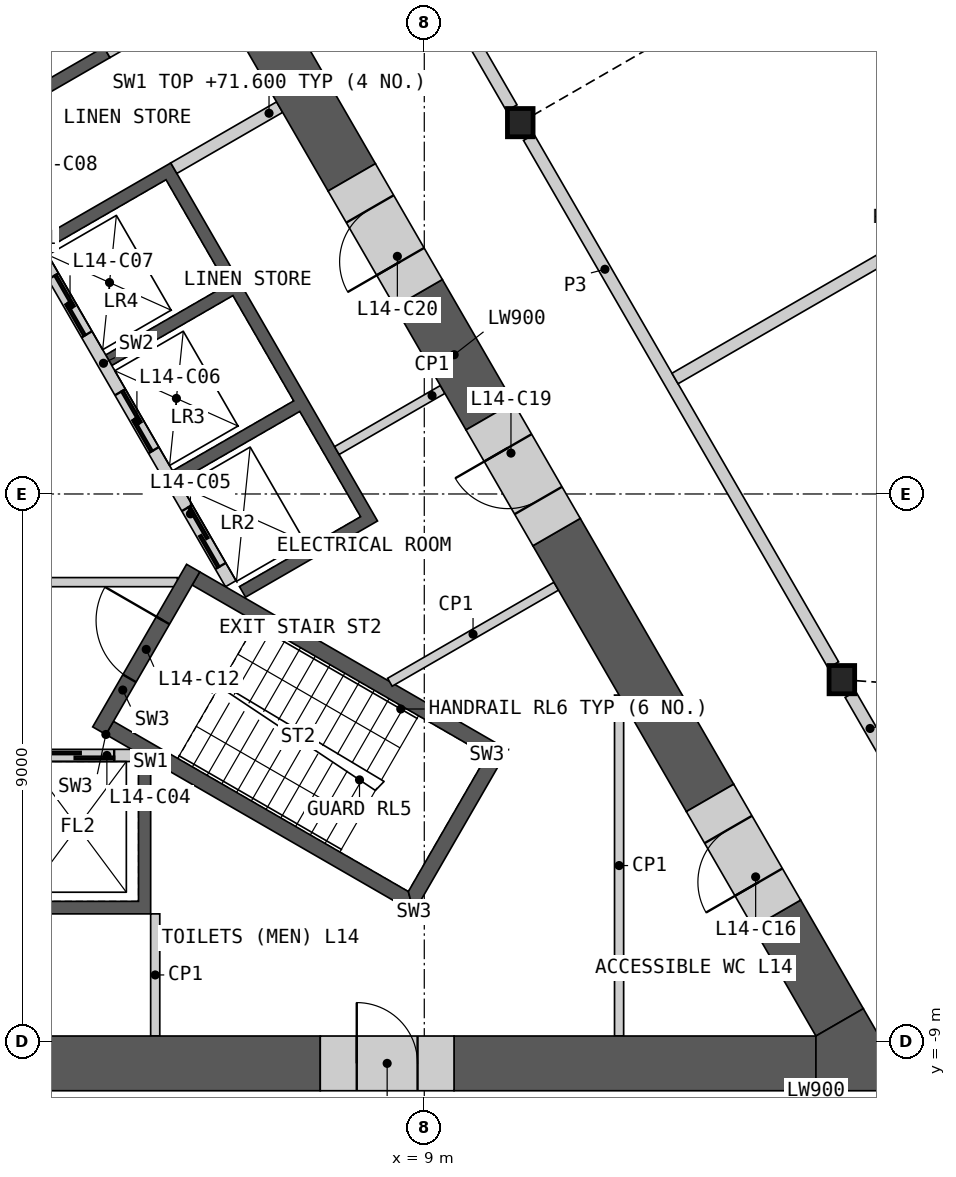
"""IFC4 building model, lengths in metres.
Left out: names, types, materials, properties, quantities, classifications, styles, units other than length and angle.
Written with IfcOpenShell. Run it as: python <this file> out.ifc"""

import sys

from ifc_helpers import new_model, si_unit, direction, frame, frame_2d, origin, origin_2d, place, context, subcontext, project, spatial, polyline, rectangle, i_section, outline, extrude, element, fill, save


model = new_model("IFC4")
c1 = context("Model", 3, precision=1e-05, world=origin(), true_north=direction((0.0, 1.0)))
c2 = subcontext(c1, "Body", "Model", "MODEL_VIEW")
j1 = project(units=[si_unit("LENGTHUNIT", "METRE"), si_unit("PLANEANGLEUNIT", "RADIAN")], contexts=[c1])
p1 = place(None, origin())
s1 = spatial("IfcSite", under=j1, at=p1, CompositionType="ELEMENT")
p2 = place(p1, origin())
s2 = spatial("IfcBuilding", under=s1, at=p2, CompositionType="ELEMENT")
p3 = place(p2, frame((0.0, 0.0, 67.8)))
s3 = spatial("IfcBuildingStorey", under=s2, at=p3, CompositionType="ELEMENT", Elevation=67.8)
for number, where, z_axis, x_axis in (
    (1, (15.868, -3.054, 0.0), (0.0, 0.0, 1.0), (1.0, 0.0, 0.0)),
    (2, (10.578, 6.107, 0.0), (0.0, 0.0, 1.0), (1.0, 0.0, 0.0)),
):
    element("IfcColumn", number, at=place(p3, frame(where, z_axis=z_axis, x_axis=x_axis)), inside=s3, PredefinedType="COLUMN", context=c2, shape_type="SweptSolid", body=[
        extrude(i_section(OverallWidth=0.421, OverallDepth=0.465, WebThickness=0.045, FlangeThickness=0.072, at=origin_2d()), origin(), (0.0, 0.0, 1.0), 4.2),
    ])
p4 = place(p3, origin())
e3 = element("IfcWall", 3, at=p4, inside=s3, PredefinedType="SHEAR", context=c2, shape_type="SweptSolid", body=[
    extrude(outline(polyline([(4.5, -4.4), (4.5, -6.906), (-4.5, -6.906), (-4.5, -4.4), (-4.3, -4.4), (-4.3, -6.7), (-2.3, -6.7), (-2.3, -4.4), (-2.1, -4.4), (-2.1, -6.7), (-0.1, -6.7), (-0.1, -4.4), (0.1, -4.4), (0.1, -6.7), (2.1, -6.7), (2.1, -4.4), (2.3, -4.4), (2.3, -6.7), (4.3, -6.7), (4.3, -4.4), (4.5, -4.4)])), origin(), (0.0, 0.0, 1.0), 3.8),
])
p5 = place(p3, frame((-4.187, -4.3, 0.0), z_axis=(0.0, 0.0, 1.0), x_axis=(1.0, 0.0, 0.0)))
e4 = element("IfcWall", 4, at=p5, inside=s3, PredefinedType="SOLIDWALL", context=c2, shape_type="SweptSolid", body=[
    extrude(rectangle(XDim=8.373, YDim=0.2, at=frame_2d((4.187, 0.0))), origin(), (0.0, 0.0, 1.0), 3.8),
])
p6 = place(p5, frame((0.287, 0.0, 0.0)))
e5 = element("IfcOpeningElement", 5, at=p6, cuts=e4, PredefinedType="OPENING", context=c2, shape_type="SweptSolid", body=[
    extrude(rectangle(XDim=1.2, YDim=2.1, at=frame_2d((0.6, 1.05))), frame((0.0, 0.11, 0.0), z_axis=(0.0, -1.0, 0.0), x_axis=(1.0, 0.0, 0.0)), (0.0, 0.0, 1.0), 0.22),
])
p7 = place(p5, frame((2.387, 0.0, 0.0)))
e6 = element("IfcOpeningElement", 6, at=p7, cuts=e4, PredefinedType="OPENING", context=c2, shape_type="SweptSolid", body=[
    extrude(rectangle(XDim=1.4, YDim=2.1, at=frame_2d((0.7, 1.05))), frame((0.0, 0.11, 0.0), z_axis=(0.0, -1.0, 0.0), x_axis=(1.0, 0.0, 0.0)), (0.0, 0.0, 1.0), 0.22),
])
p8 = place(p5, frame((4.737, 0.0, 0.0)))
e7 = element("IfcOpeningElement", 7, at=p8, cuts=e4, PredefinedType="OPENING", context=c2, shape_type="SweptSolid", body=[
    extrude(rectangle(XDim=1.1, YDim=2.1, at=frame_2d((0.55, 1.05))), frame((0.0, 0.11, 0.0), z_axis=(0.0, -1.0, 0.0), x_axis=(1.0, 0.0, 0.0)), (0.0, 0.0, 1.0), 0.22),
])
p9 = place(p5, frame((6.887, 0.0, 0.0)))
e8 = element("IfcOpeningElement", 8, at=p9, cuts=e4, PredefinedType="OPENING", context=c2, shape_type="SweptSolid", body=[
    extrude(rectangle(XDim=1.2, YDim=2.1, at=frame_2d((0.6, 1.05))), frame((0.0, 0.11, 0.0), z_axis=(0.0, -1.0, 0.0), x_axis=(1.0, 0.0, 0.0)), (0.0, 0.0, 1.0), 0.22),
])
p10 = place(p3, origin())
e9 = element("IfcWall", 9, at=p10, inside=s3, PredefinedType="SHEAR", context=c2, shape_type="SweptSolid", body=[
    extrude(outline(polyline([(1.561, 6.097), (3.731, 7.35), (3.831, 7.177), (1.66, 5.924), (1.561, 6.097)])), origin(), (0.0, 0.0, 1.0), 3.8),
])
p11 = place(p3, origin())
e10 = element("IfcWall", 10, at=p11, inside=s3, PredefinedType="SHEAR", context=c2, shape_type="SweptSolid", body=[
    extrude(outline(polyline([(2.66, 4.192), (4.831, 5.445), (8.231, -0.444), (6.061, -1.697), (5.96, -1.524), (7.952, -0.374), (6.952, 1.358), (4.96, 0.208), (4.861, 0.381), (6.852, 1.531), (5.852, 3.263), (3.861, 2.113), (3.76, 2.287), (5.752, 3.437), (4.752, 5.169), (2.76, 4.019), (2.66, 4.192)])), origin(), (0.0, 0.0, 1.0), 3.8),
])
p12 = place(p3, frame((5.817, -1.476, 0.0), z_axis=(0.0, 0.0, 1.0), x_axis=(-0.500002616675, 0.866023893041, 0.0)))
e11 = element("IfcWall", 11, at=p12, inside=s3, PredefinedType="SOLIDWALL", context=c2, shape_type="SweptSolid", body=[
    extrude(rectangle(XDim=8.373, YDim=0.2, at=frame_2d((4.187, 0.0))), origin(), (0.0, 0.0, 1.0), 3.8),
])
p13 = place(p12, frame((0.337, 0.0, 0.0)))
e12 = element("IfcOpeningElement", 12, at=p13, cuts=e11, PredefinedType="OPENING", context=c2, shape_type="SweptSolid", body=[
    extrude(rectangle(XDim=1.1, YDim=2.1, at=frame_2d((0.55, 1.05))), frame((0.0, 0.11, 0.0), z_axis=(0.0, -1.0, 0.0), x_axis=(1.0, 0.0, 0.0)), (0.0, 0.0, 1.0), 0.22),
])
p14 = place(p12, frame((2.537, 0.0, 0.0)))
e13 = element("IfcOpeningElement", 13, at=p14, cuts=e11, PredefinedType="OPENING", context=c2, shape_type="SweptSolid", body=[
    extrude(rectangle(XDim=1.1, YDim=2.1, at=frame_2d((0.55, 1.05))), frame((0.0, 0.11, 0.0), z_axis=(0.0, -1.0, 0.0), x_axis=(1.0, 0.0, 0.0)), (0.0, 0.0, 1.0), 0.22),
])
p15 = place(p12, frame((4.737, 0.0, 0.0)))
e14 = element("IfcOpeningElement", 14, at=p15, cuts=e11, PredefinedType="OPENING", context=c2, shape_type="SweptSolid", body=[
    extrude(rectangle(XDim=1.1, YDim=2.1, at=frame_2d((0.55, 1.05))), frame((0.0, 0.11, 0.0), z_axis=(0.0, -1.0, 0.0), x_axis=(1.0, 0.0, 0.0)), (0.0, 0.0, 1.0), 0.22),
])
p16 = place(p12, frame((7.037, 0.0, 0.0)))
e15 = element("IfcOpeningElement", 15, at=p16, cuts=e11, PredefinedType="OPENING", context=c2, shape_type="SweptSolid", body=[
    extrude(rectangle(XDim=0.9, YDim=2.1, at=frame_2d((0.45, 1.05))), frame((0.0, 0.11, 0.0), z_axis=(0.0, -1.0, 0.0), x_axis=(1.0, 0.0, 0.0)), (0.0, 0.0, 1.0), 0.22),
])
p17 = place(p3, frame((4.881, 5.358, 0.0), z_axis=(0.0, 0.0, 1.0), x_axis=(0.866035824272, 0.499981950752, 0.0)))
e16 = element("IfcWall", 16, at=p17, inside=s3, PredefinedType="SHEAR", context=c2, shape_type="SweptSolid", body=[
    extrude(rectangle(XDim=2.009, YDim=0.2, at=frame_2d((1.004, 0.0))), origin(), (0.0, 0.0, 1.0), 3.8),
])
p18 = place(p3, frame((3.781, 7.263, 0.0), z_axis=(0.0, 0.0, 1.0), x_axis=(0.865983199114, 0.50007309351, 0.0)))
e17 = element("IfcWall", 17, at=p18, inside=s3, PredefinedType="SHEAR", context=c2, shape_type="SweptSolid", body=[
    extrude(rectangle(XDim=2.009, YDim=0.2, at=frame_2d((1.004, 0.0))), origin(), (0.0, 0.0, 1.0), 3.8),
])
p19 = place(p3, frame((-4.941, -1.45, 0.0), z_axis=(0.0, 0.0, 1.0), x_axis=(1.0, 0.0, 0.0)))
e18 = element("IfcWall", 18, at=p19, inside=s3, PredefinedType="PARTITIONING", context=c2, shape_type="SweptSolid", body=[
    extrude(rectangle(XDim=9.882, YDim=0.15, at=frame_2d((4.941, 0.0))), origin(), (0.0, 0.0, 1.0), 3.8),
])
p20 = place(p19, frame((4.391, 0.0, 0.0)))
e19 = element("IfcOpeningElement", 19, at=p20, cuts=e18, PredefinedType="OPENING", context=c2, shape_type="SweptSolid", body=[
    extrude(rectangle(XDim=1.1, YDim=2.1, at=frame_2d((0.55, 1.05))), frame((0.0, 0.085, 0.0), z_axis=(0.0, -1.0, 0.0), x_axis=(1.0, 0.0, 0.0)), (0.0, 0.0, 1.0), 0.17),
])
p21 = place(p3, origin())
e20 = element("IfcWall", 20, at=p21, inside=s3, PredefinedType="SHEAR", context=c2, shape_type="SweptSolid", body=[
    extrude(outline(polyline([(3.763, -3.956), (8.83, -6.881), (8.738, -6.539), (3.888, -3.739), (3.763, -3.956)])), origin(), (0.0, 0.0, 1.0), 3.8),
])
p22 = place(p3, origin())
e21 = element("IfcWall", 21, at=p22, inside=s3, PredefinedType="SHEAR", context=c2, shape_type="SweptSolid", body=[
    extrude(outline(polyline([(8.83, -6.881), (10.374, -4.206), (10.032, -4.298), (8.738, -6.539), (8.83, -6.881)])), origin(), (0.0, 0.0, 1.0), 3.8),
])
p23 = place(p3, origin())
e22 = element("IfcWall", 22, at=p23, inside=s3, PredefinedType="SHEAR", context=c2, shape_type="SweptSolid", body=[
    extrude(outline(polyline([(10.032, -4.298), (10.374, -4.206), (5.307, -1.281), (5.182, -1.498), (10.032, -4.298)])), origin(), (0.0, 0.0, 1.0), 3.8),
])
p24 = place(p3, frame((3.655, -3.893, 0.0), z_axis=(0.0, 0.0, 1.0), x_axis=(0.499982516597, 0.866035497597, 0.0)))
e23 = element("IfcWall", 23, at=p24, inside=s3, PredefinedType="SHEAR", context=c2, shape_type="SweptSolid", body=[
    extrude(rectangle(XDim=3.088, YDim=0.25, at=frame_2d((1.544, 0.0))), origin(), (0.0, 0.0, 1.0), 3.8),
])
p25 = place(p24, frame((0.994, 0.0, 0.0)))
e24 = element("IfcOpeningElement", 24, at=p25, cuts=e23, PredefinedType="OPENING", context=c2, shape_type="SweptSolid", body=[
    extrude(rectangle(XDim=1.1, YDim=2.1, at=frame_2d((0.55, 1.05))), frame((0.0, 0.135, 0.0), z_axis=(0.0, -1.0, 0.0), x_axis=(1.0, 0.0, 0.0)), (0.0, 0.0, 1.0), 0.27),
])
p26 = place(p3, frame((4.575, -6.906, 0.0), z_axis=(0.0, 0.0, 1.0), x_axis=(0.0, -1.0, 0.0)))
e25 = element("IfcWall", 25, at=p26, inside=s3, PredefinedType="PARTITIONING", context=c2, shape_type="SweptSolid", body=[
    extrude(rectangle(XDim=2.009, YDim=0.15, at=frame_2d((1.004, 0.0))), origin(), (0.0, 0.0, 1.0), 3.8),
])
p27 = place(p3, frame((9.302, 1.719, 0.0), z_axis=(0.0, 0.0, 1.0), x_axis=(-0.866035824272, -0.499981950752, 0.0)))
e26 = element("IfcWall", 26, at=p27, inside=s3, PredefinedType="PARTITIONING", context=c2, shape_type="SweptSolid", body=[
    extrude(rectangle(XDim=2.009, YDim=0.15, at=frame_2d((1.004, 0.0))), origin(), (0.0, 0.0, 1.0), 3.8),
])
p28 = place(p3, frame((11.17, -1.517, 0.0), z_axis=(0.0, 0.0, 1.0), x_axis=(-0.866037599206, -0.499978876315, 0.0)))
e27 = element("IfcWall", 27, at=p28, inside=s3, PredefinedType="PARTITIONING", context=c2, shape_type="SweptSolid", body=[
    extrude(rectangle(XDim=3.159, YDim=0.15, at=frame_2d((1.58, 0.0))), origin(), (0.0, 0.0, 1.0), 3.8),
])
p29 = place(p3, frame((12.204, -8.915, 0.0), z_axis=(0.0, 0.0, 1.0), x_axis=(0.0, 1.0, 0.0)))
e28 = element("IfcWall", 28, at=p29, inside=s3, PredefinedType="PARTITIONING", context=c2, shape_type="SweptSolid", body=[
    extrude(rectangle(XDim=5.607, YDim=0.15, at=frame_2d((2.804, 0.0))), origin(), (0.0, 0.0, 1.0), 3.8),
])
p30 = place(p3, frame((1.1, -9.365, 0.0), z_axis=(0.0, 0.0, 1.0), x_axis=(1.0, 0.0, 0.0)))
e29 = element("IfcWall", 29, at=p30, inside=s3, PredefinedType="SHEAR", context=c2, shape_type="SweptSolid", body=[
    extrude(rectangle(XDim=6.189, YDim=0.9, at=frame_2d((3.095, 0.0))), origin(), (0.0, 0.0, 1.0), 3.8),
])
p31 = place(p3, frame((9.49, -9.365, 0.0), z_axis=(0.0, 0.0, 1.0), x_axis=(1.0, 0.0, 0.0)))
e30 = element("IfcWall", 30, at=p31, inside=s3, PredefinedType="SHEAR", context=c2, shape_type="SweptSolid", body=[
    extrude(rectangle(XDim=5.952, YDim=0.9, at=frame_2d((2.976, 0.0))), origin(), (0.0, 0.0, 1.0), 3.8),
])
p32 = place(p3, frame((7.807, 5.208, 0.0), z_axis=(0.0, 0.0, 1.0), x_axis=(-0.499986664161, 0.866033103098, 0.0)))
e31 = element("IfcWall", 31, at=p32, inside=s3, PredefinedType="SHEAR", context=c2, shape_type="SweptSolid", body=[
    extrude(rectangle(XDim=6.586, YDim=0.9, at=frame_2d((3.293, 0.0))), origin(), (0.0, 0.0, 1.0), 3.8),
])
p33 = place(p3, frame((13.7, -4.999, 0.0), z_axis=(0.0, 0.0, 1.0), x_axis=(-0.499993158726, 0.86602935356, 0.0)))
e32 = element("IfcWall", 32, at=p33, inside=s3, PredefinedType="SHEAR", context=c2, shape_type="SweptSolid", body=[
    extrude(rectangle(XDim=5.048, YDim=0.9, at=frame_2d((2.524, 0.0))), origin(), (0.0, 0.0, 1.0), 3.8),
])
p34 = place(p3, frame((10.075, 1.279, 0.0), z_axis=(0.0, 0.0, 1.0), x_axis=(-0.500026924946, 0.866009858102, 0.0)))
e33 = element("IfcWall", 33, at=p34, inside=s3, PredefinedType="SHEAR", context=c2, shape_type="SweptSolid", body=[
    extrude(rectangle(XDim=2.337, YDim=0.9, at=frame_2d((1.168, 0.0))), origin(), (0.0, 0.0, 1.0), 3.8),
])
p35 = place(p3, frame((15.831, -8.69, 0.0), z_axis=(0.0, 0.0, 1.0), x_axis=(-0.499971832445, 0.866041665719, 0.0)))
e34 = element("IfcWall", 34, at=p35, inside=s3, PredefinedType="SHEAR", context=c2, shape_type="SweptSolid", body=[
    extrude(rectangle(XDim=2.062, YDim=0.9, at=frame_2d((1.031, 0.0))), origin(), (0.0, 0.0, 1.0), 3.8),
])
p36 = place(p3, origin())
e35 = element("IfcWall", 35, at=p36, inside=s3, PredefinedType="SHEAR", context=c2, shape_type="SweptSolid", body=[
    extrude(outline(polyline([(15.441, -9.815), (15.441, -8.915), (16.221, -8.465), (17.0, -9.815), (15.441, -9.815)])), origin(), (0.0, 0.0, 1.0), 3.8),
])
p37 = place(p3, frame((14.8, -6.904, 0.0), z_axis=(0.0, 0.0, 1.0), x_axis=(-0.50002983664, 0.866008176907, 0.0)))
e36 = element("IfcWall", 36, at=p37, inside=s3, PredefinedType="SHEAR", context=c2, shape_type="SweptSolid", body=[
    extrude(rectangle(XDim=2.2, YDim=0.9, at=frame_2d((1.1, 0.0))), origin(), (0.0, 0.0, 1.0), 3.8),
])
p38 = place(p37, frame((0.6, 0.0, 0.0)))
e37 = element("IfcOpeningElement", 37, at=p38, cuts=e36, PredefinedType="OPENING", context=c2, shape_type="SweptSolid", body=[
    extrude(rectangle(XDim=1.0, YDim=2.1, at=frame_2d((0.5, 1.05))), frame((0.0, 0.46, 0.0), z_axis=(0.0, -1.0, 0.0), x_axis=(1.0, 0.0, 0.0)), (0.0, 0.0, 1.0), 0.92),
])
p39 = place(p3, frame((7.289, -9.365, 0.0), z_axis=(0.0, 0.0, 1.0), x_axis=(1.0, 0.0, 0.0)))
e38 = element("IfcWall", 38, at=p39, inside=s3, PredefinedType="SHEAR", context=c2, shape_type="SweptSolid", body=[
    extrude(rectangle(XDim=2.2, YDim=0.9, at=frame_2d((1.1, 0.0))), origin(), (0.0, 0.0, 1.0), 3.8),
])
p40 = place(p39, frame((0.6, 0.0, 0.0)))
e39 = element("IfcOpeningElement", 39, at=p40, cuts=e38, PredefinedType="OPENING", context=c2, shape_type="SweptSolid", body=[
    extrude(rectangle(XDim=1.0, YDim=2.1, at=frame_2d((0.5, 1.05))), frame((0.0, 0.46, 0.0), z_axis=(0.0, -1.0, 0.0), x_axis=(1.0, 0.0, 0.0)), (0.0, 0.0, 1.0), 0.92),
])
p41 = place(p3, frame((11.176, -0.627, 0.0), z_axis=(0.0, 0.0, 1.0), x_axis=(-0.499946605688, 0.86605622881, 0.0)))
e40 = element("IfcWall", 40, at=p41, inside=s3, PredefinedType="SHEAR", context=c2, shape_type="SweptSolid", body=[
    extrude(rectangle(XDim=2.2, YDim=0.9, at=frame_2d((1.1, 0.0))), origin(), (0.0, 0.0, 1.0), 3.8),
])
p42 = place(p41, frame((0.6, 0.0, 0.0)))
e41 = element("IfcOpeningElement", 41, at=p42, cuts=e40, PredefinedType="OPENING", context=c2, shape_type="SweptSolid", body=[
    extrude(rectangle(XDim=1.0, YDim=2.1, at=frame_2d((0.5, 1.05))), frame((0.0, 0.46, 0.0), z_axis=(0.0, -1.0, 0.0), x_axis=(1.0, 0.0, 0.0)), (0.0, 0.0, 1.0), 0.92),
])
p43 = place(p3, frame((8.907, 3.302, 0.0), z_axis=(0.0, 0.0, 1.0), x_axis=(-0.50002983664, 0.866008176907, 0.0)))
e42 = element("IfcWall", 42, at=p43, inside=s3, PredefinedType="SHEAR", context=c2, shape_type="SweptSolid", body=[
    extrude(rectangle(XDim=2.2, YDim=0.9, at=frame_2d((1.1, 0.0))), origin(), (0.0, 0.0, 1.0), 3.8),
])
p44 = place(p43, frame((0.6, 0.0, 0.0)))
e43 = element("IfcOpeningElement", 43, at=p44, cuts=e42, PredefinedType="OPENING", context=c2, shape_type="SweptSolid", body=[
    extrude(rectangle(XDim=1.0, YDim=2.1, at=frame_2d((0.5, 1.05))), frame((0.0, 0.46, 0.0), z_axis=(0.0, -1.0, 0.0), x_axis=(1.0, 0.0, 0.0)), (0.0, 0.0, 1.0), 0.92),
])
p45 = place(p3, frame((10.719, 5.865, 0.0), z_axis=(0.0, 0.0, 1.0), x_axis=(0.49999175339, -0.866030164915, 0.0)))
e44 = element("IfcWall", 44, at=p45, inside=s3, PredefinedType="PARTITIONING", context=c2, shape_type="SweptSolid", body=[
    extrude(rectangle(XDim=10.019, YDim=0.2, at=frame_2d((5.009, 0.0))), origin(), (0.0, 0.0, 1.0), 3.8),
])
p46 = place(p3, frame((5.429, 15.026, 0.0), z_axis=(0.0, 0.0, 1.0), x_axis=(0.50001002959, -0.86601961312, 0.0)))
e45 = element("IfcWall", 45, at=p46, inside=s3, PredefinedType="PARTITIONING", context=c2, shape_type="SweptSolid", body=[
    extrude(rectangle(XDim=10.019, YDim=0.2, at=frame_2d((5.009, 0.0))), origin(), (0.0, 0.0, 1.0), 3.8),
])
p47 = place(p46, frame((7.165, 0.0, 0.0)))
e46 = element("IfcOpeningElement", 46, at=p47, cuts=e45, PredefinedType="OPENING", context=c2, shape_type="SweptSolid", body=[
    extrude(rectangle(XDim=1.0, YDim=2.1, at=frame_2d((0.5, 1.05))), frame((0.0, 0.11, 0.0), z_axis=(0.0, -1.0, 0.0), x_axis=(1.0, 0.0, 0.0)), (0.0, 0.0, 1.0), 0.22),
])
p48 = place(p3, frame((16.008, -3.296, 0.0), z_axis=(0.0, 0.0, 1.0), x_axis=(0.499984737558, -0.86603421538, 0.0)))
e47 = element("IfcWall", 47, at=p48, inside=s3, PredefinedType="PARTITIONING", context=c2, shape_type="SweptSolid", body=[
    extrude(rectangle(XDim=6.473, YDim=0.2, at=frame_2d((3.236, 0.0))), origin(), (0.0, 0.0, 1.0), 3.8),
])
p49 = place(p48, frame((2.285, 0.0, 0.0)))
e48 = element("IfcOpeningElement", 48, at=p49, cuts=e47, PredefinedType="OPENING", context=c2, shape_type="SweptSolid", body=[
    extrude(rectangle(XDim=1.8, YDim=2.1, at=frame_2d((0.9, 1.05))), frame((0.0, 0.11, 0.0), z_axis=(0.0, -1.0, 0.0), x_axis=(1.0, 0.0, 0.0)), (0.0, 0.0, 1.0), 0.22),
])
p50 = place(p3, frame((13.124, 1.899, 0.0), z_axis=(0.0, 0.0, 1.0), x_axis=(0.866024086673, 0.500002281298, 0.0)))
e49 = element("IfcWall", 49, at=p50, inside=s3, PredefinedType="PARTITIONING", context=c2, shape_type="SweptSolid", body=[
    extrude(rectangle(XDim=8.584, YDim=0.2, at=frame_2d((4.292, 0.0))), origin(), (0.0, 0.0, 1.0), 2.885),
])
p51 = place(p9, origin())
e50 = element("IfcDoor", 50, at=p51, inside=s3, OperationType="SLIDING_TO_LEFT", PredefinedType="DOOR", context=c2, shape_type="SweptSolid", body=[
    extrude(rectangle(XDim=1.2, YDim=2.1, at=frame_2d((0.6, 1.05))), frame((0.0, 0.025, 0.0), z_axis=(0.0, -1.0, 0.0), x_axis=(1.0, 0.0, 0.0)), (0.0, 0.0, 1.0), 0.05),
])
fill(e8, e50)
p52 = place(p13, origin())
e51 = element("IfcDoor", 51, at=p52, inside=s3, OperationType="SLIDING_TO_LEFT", PredefinedType="DOOR", context=c2, shape_type="SweptSolid", body=[
    extrude(rectangle(XDim=1.1, YDim=2.1, at=frame_2d((0.55, 1.05))), frame((0.0, 0.025, 0.0), z_axis=(0.0, -1.0, 0.0), x_axis=(1.0, 0.0, 0.0)), (0.0, 0.0, 1.0), 0.05),
])
fill(e12, e51)
p53 = place(p14, origin())
e52 = element("IfcDoor", 52, at=p53, inside=s3, OperationType="SLIDING_TO_LEFT", PredefinedType="DOOR", context=c2, shape_type="SweptSolid", body=[
    extrude(rectangle(XDim=1.1, YDim=2.1, at=frame_2d((0.55, 1.05))), frame((0.0, 0.025, 0.0), z_axis=(0.0, -1.0, 0.0), x_axis=(1.0, 0.0, 0.0)), (0.0, 0.0, 1.0), 0.05),
])
fill(e13, e52)
p54 = place(p15, origin())
e53 = element("IfcDoor", 53, at=p54, inside=s3, OperationType="SLIDING_TO_LEFT", PredefinedType="DOOR", context=c2, shape_type="SweptSolid", body=[
    extrude(rectangle(XDim=1.1, YDim=2.1, at=frame_2d((0.55, 1.05))), frame((0.0, 0.025, 0.0), z_axis=(0.0, -1.0, 0.0), x_axis=(1.0, 0.0, 0.0)), (0.0, 0.0, 1.0), 0.05),
])
fill(e14, e53)
p55 = place(p25, origin())
e54 = element("IfcDoor", 54, at=p55, inside=s3, OperationType="SINGLE_SWING_RIGHT", PredefinedType="DOOR", context=c2, shape_type="SweptSolid", body=[
    extrude(rectangle(XDim=1.1, YDim=2.1, at=frame_2d((0.55, 1.05))), frame((0.0, 0.025, 0.0), z_axis=(0.0, -1.0, 0.0), x_axis=(1.0, 0.0, 0.0)), (0.0, 0.0, 1.0), 0.05),
])
fill(e24, e54)
p56 = place(p38, origin())
e55 = element("IfcDoor", 55, at=p56, inside=s3, OperationType="SINGLE_SWING_LEFT", PredefinedType="DOOR", context=c2, shape_type="SweptSolid", body=[
    extrude(rectangle(XDim=1.0, YDim=2.1, at=frame_2d((0.5, 1.05))), frame((0.0, 0.205, 0.0), z_axis=(0.0, -1.0, 0.0), x_axis=(1.0, 0.0, 0.0)), (0.0, 0.0, 1.0), 0.05),
])
fill(e37, e55)
p57 = place(p40, origin())
e56 = element("IfcDoor", 56, at=p57, inside=s3, OperationType="SINGLE_SWING_LEFT", PredefinedType="DOOR", context=c2, shape_type="SweptSolid", body=[
    extrude(rectangle(XDim=1.0, YDim=2.1, at=frame_2d((0.5, 1.05))), frame((0.0, 0.205, 0.0), z_axis=(0.0, -1.0, 0.0), x_axis=(1.0, 0.0, 0.0)), (0.0, 0.0, 1.0), 0.05),
])
fill(e39, e56)
p58 = place(p42, origin())
e57 = element("IfcDoor", 57, at=p58, inside=s3, OperationType="SINGLE_SWING_RIGHT", PredefinedType="DOOR", context=c2, shape_type="SweptSolid", body=[
    extrude(rectangle(XDim=1.0, YDim=2.1, at=frame_2d((0.5, 1.05))), frame((0.0, 0.205, 0.0), z_axis=(0.0, -1.0, 0.0), x_axis=(1.0, 0.0, 0.0)), (0.0, 0.0, 1.0), 0.05),
])
fill(e41, e57)
p59 = place(p44, origin())
e58 = element("IfcDoor", 58, at=p59, inside=s3, OperationType="SINGLE_SWING_LEFT", PredefinedType="DOOR", context=c2, shape_type="SweptSolid", body=[
    extrude(rectangle(XDim=1.0, YDim=2.1, at=frame_2d((0.5, 1.05))), frame((0.0, 0.205, 0.0), z_axis=(0.0, -1.0, 0.0), x_axis=(1.0, 0.0, 0.0)), (0.0, 0.0, 1.0), 0.05),
])
fill(e43, e58)
save(model, sys.argv[1])
